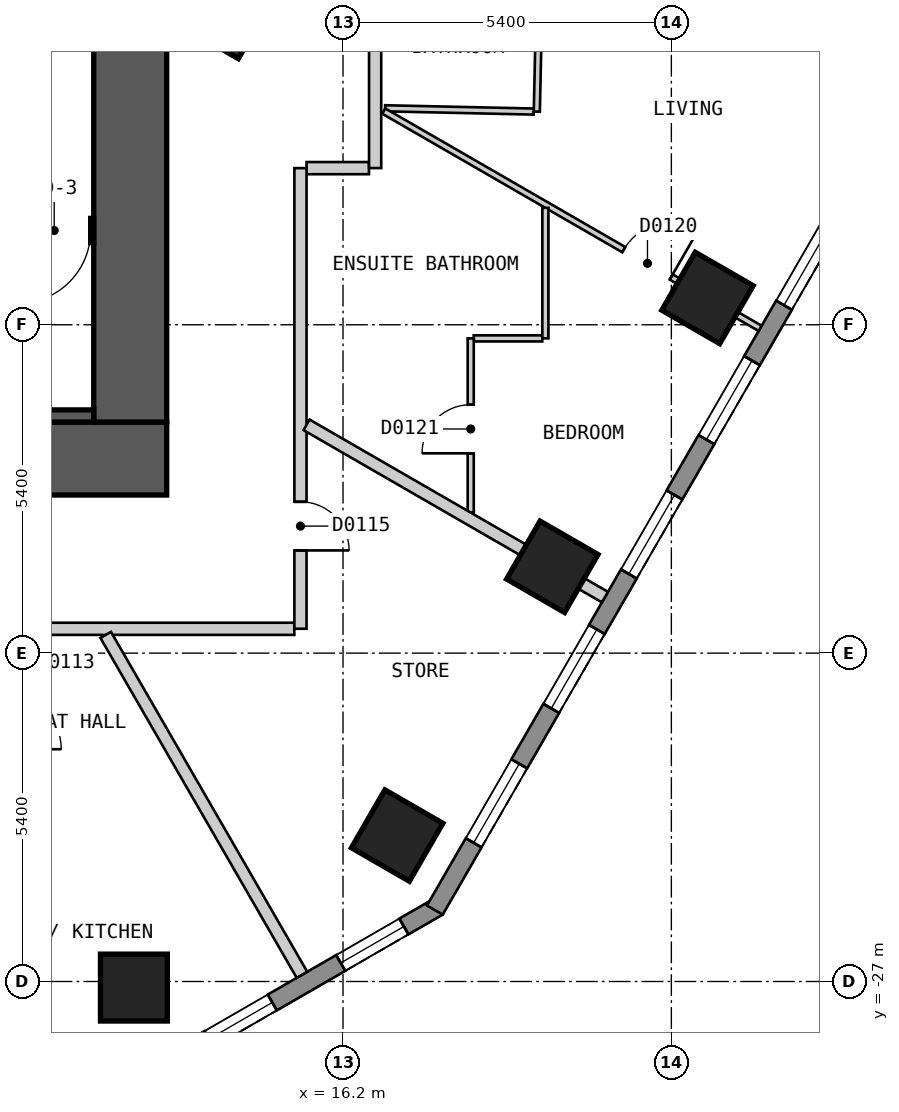
"""IFC4 building model, lengths in metres.
Left out: names, types, materials, properties, quantities, classifications, styles, units other than length and angle.
Written with IfcOpenShell. Run it as: python <this file> out.ifc"""

import sys

from ifc_helpers import new_model, si_unit, direction, frame, frame_2d, origin, origin_2d, place, context, subcontext, project, spatial, polyline, rectangle, outline, extrude, element, fill, save


model = new_model("IFC4")
c1 = context("Model", 3, precision=1e-05, world=origin(), true_north=direction((0.0, 1.0)))
c2 = subcontext(c1, "Body", "Model", "MODEL_VIEW")
j1 = project(units=[si_unit("LENGTHUNIT", "METRE"), si_unit("PLANEANGLEUNIT", "RADIAN")], contexts=[c1])
p1 = place(None, origin())
s1 = spatial("IfcSite", under=j1, at=p1, CompositionType="ELEMENT")
p2 = place(p1, origin())
s2 = spatial("IfcBuilding", under=s1, at=p2, CompositionType="ELEMENT")
p3 = place(p2, frame((0.0, 0.0, 23.4)))
s3 = spatial("IfcBuildingStorey", under=s2, at=p3, CompositionType="ELEMENT", Elevation=23.4)
for number, where, z_axis, x_axis in (
    (1, (12.761, -27.1, 0.0), (0.0, 0.0, 1.0), (1.0, 0.0, 0.0)),
    (2, (17.09, -24.6, 0.0), (0.0, 0.0, 1.0), (0.5, 0.866, 0.0)),
    (3, (19.642, -20.18, 0.0), (0.0, 0.0, 1.0), (0.5, 0.866, 0.0)),
    (4, (22.194, -15.759, 0.0), (0.0, 0.0, 1.0), (0.5, 0.866, 0.0)),
    (5, (24.746, -11.339, 0.0), (0.0, 0.0, 1.0), (0.5, 0.866, 0.0)),
):
    element("IfcColumn", number, at=place(p3, frame(where, z_axis=z_axis, x_axis=x_axis)), inside=s3, PredefinedType="COLUMN", context=c2, shape_type="SweptSolid", body=[
        extrude(rectangle(XDim=1.1, YDim=1.1, at=origin_2d()), origin(), (0.0, 0.0, 1.0), 3.0),
    ])
p4 = place(p3, frame((14.313, -11.209, 0.0), z_axis=(0.0, 0.0, 1.0), x_axis=(0.499984884929, 0.866034130299, 0.0)))
e6 = element("IfcColumn", 6, at=p4, inside=s3, PredefinedType="COLUMN", context=c2, shape_type="SweptSolid", body=[
    extrude(rectangle(XDim=0.9, YDim=0.9, at=origin_2d()), origin(), (0.0, 0.0, 1.0), 3.0),
])
p5 = place(p3, frame((-13.3, -18.4, 0.0), z_axis=(0.0, 0.0, 1.0), x_axis=(1.0, 0.0, 0.0)))
e7 = element("IfcWall", 7, at=p5, inside=s3, PredefinedType="SHEAR", context=c2, shape_type="SweptSolid", body=[
    extrude(rectangle(XDim=26.6, YDim=1.2, at=frame_2d((13.3, 0.0))), origin(), (0.0, 0.0, 1.0), 2.7),
])
p6 = place(p3, frame((12.7, -17.8, 0.0), z_axis=(0.0, 0.0, 1.0), x_axis=(0.0, 1.0, 0.0)))
e8 = element("IfcWall", 8, at=p6, inside=s3, PredefinedType="SHEAR", context=c2, shape_type="SweptSolid", body=[
    extrude(rectangle(XDim=11.6, YDim=1.2, at=frame_2d((5.8, 0.0))), origin(), (0.0, 0.0, 1.0), 2.7),
])
p7 = place(p3, frame((-12.1, -14.65, 0.0), z_axis=(0.0, 0.0, 1.0), x_axis=(1.0, 0.0, 0.0)))
e9 = element("IfcWall", 9, at=p7, inside=s3, PredefinedType="SHEAR", context=c2, shape_type="SweptSolid", body=[
    extrude(rectangle(XDim=24.2, YDim=0.4, at=frame_2d((12.1, 0.0))), origin(), (0.0, 0.0, 1.0), 2.7),
])
p8 = place(p7, frame((1.3, 0.0, 0.0), z_axis=(0.0, 0.0, 1.0), x_axis=(-1.0, 0.0, 0.0)))
e10 = element("IfcOpeningElement", 10, at=p8, cuts=e9, PredefinedType="OPENING", context=c2, shape_type="SweptSolid", body=[
    extrude(rectangle(XDim=1.2, YDim=2.1, at=frame_2d((0.6, 1.05))), frame((0.0, 0.21, 0.0), z_axis=(0.0, -1.0, 0.0), x_axis=(1.0, 0.0, 0.0)), (0.0, 0.0, 1.0), 0.42),
])
p9 = place(p7, frame((24.15, 0.0, 0.0), z_axis=(0.0, 0.0, 1.0), x_axis=(-1.0, 0.0, 0.0)))
e11 = element("IfcOpeningElement", 11, at=p9, cuts=e9, PredefinedType="OPENING", context=c2, shape_type="SweptSolid", body=[
    extrude(rectangle(XDim=1.2, YDim=2.1, at=frame_2d((0.6, 1.05))), frame((0.0, 0.21, 0.0), z_axis=(0.0, -1.0, 0.0), x_axis=(1.0, 0.0, 0.0)), (0.0, 0.0, 1.0), 0.42),
])
p10 = place(p7, frame((16.25, 0.0, 0.0), z_axis=(0.0, 0.0, 1.0), x_axis=(-1.0, 0.0, 0.0)))
e12 = element("IfcOpeningElement", 12, at=p10, cuts=e9, PredefinedType="OPENING", context=c2, shape_type="SweptSolid", body=[
    extrude(rectangle(XDim=0.9, YDim=2.1, at=frame_2d((0.45, 1.05))), frame((0.0, 0.21, 0.0), z_axis=(0.0, -1.0, 0.0), x_axis=(1.0, 0.0, 0.0)), (0.0, 0.0, 1.0), 0.42),
])
p11 = place(p7, frame((18.05, 0.0, 0.0), z_axis=(0.0, 0.0, 1.0), x_axis=(-1.0, 0.0, 0.0)))
e13 = element("IfcOpeningElement", 13, at=p11, cuts=e9, PredefinedType="OPENING", context=c2, shape_type="SweptSolid", body=[
    extrude(rectangle(XDim=0.9, YDim=2.1, at=frame_2d((0.45, 1.05))), frame((0.0, 0.21, 0.0), z_axis=(0.0, -1.0, 0.0), x_axis=(1.0, 0.0, 0.0)), (0.0, 0.0, 1.0), 0.42),
])
p12 = place(p3, frame((13.435, -28.27, 0.0), z_axis=(0.0, 0.0, 1.0), x_axis=(0.866010750942, 0.50002537861, 0.0)))
e14 = element("IfcWall", 14, at=p12, inside=s3, PredefinedType="SOLIDWALL", context=c2, shape_type="SweptSolid", body=[
    extrude(outline(polyline([(0.0, -0.15), (5.0, -0.15), (4.919, 0.15), (0.08, 0.15), (0.0, -0.15)])), origin(), (0.0, 0.0, 1.0), 2.7),
])
p13 = place(p12, frame((0.65, 0.0, 0.15)))
e15 = element("IfcOpeningElement", 15, at=p13, cuts=e14, PredefinedType="OPENING", context=c2, shape_type="SweptSolid", body=[
    extrude(rectangle(XDim=1.2, YDim=2.1, at=frame_2d((0.6, 1.05))), frame((0.0, 0.16, 0.0), z_axis=(0.0, -1.0, 0.0), x_axis=(1.0, 0.0, 0.0)), (0.0, 0.0, 1.0), 0.32),
])
p14 = place(p12, frame((3.149, 0.0, 0.15)))
e16 = element("IfcOpeningElement", 16, at=p14, cuts=e14, PredefinedType="OPENING", context=c2, shape_type="SweptSolid", body=[
    extrude(rectangle(XDim=1.2, YDim=2.1, at=frame_2d((0.6, 1.05))), frame((0.0, 0.16, 0.0), z_axis=(0.0, -1.0, 0.0), x_axis=(1.0, 0.0, 0.0)), (0.0, 0.0, 1.0), 0.32),
])
p15 = place(p3, frame((17.71, -25.825, 0.0), z_axis=(0.0, 0.0, 1.0), x_axis=(0.500001938803, 0.866024284413, 0.0)))
e17 = element("IfcWall", 17, at=p15, inside=s3, PredefinedType="SOLIDWALL", context=c2, shape_type="SweptSolid", body=[
    extrude(outline(polyline([(0.0, -0.15), (27.02, -0.15), (26.94, 0.15), (0.08, 0.15), (0.0, -0.15)])), origin(), (0.0, 0.0, 1.0), 2.7),
])
p16 = place(p15, frame((1.277, 0.0, 0.15)))
e18 = element("IfcOpeningElement", 18, at=p16, cuts=e17, PredefinedType="OPENING", context=c2, shape_type="SweptSolid", body=[
    extrude(rectangle(XDim=1.5, YDim=2.1, at=frame_2d((0.75, 1.05))), frame((0.0, 0.16, 0.0), z_axis=(0.0, -1.0, 0.0), x_axis=(1.0, 0.0, 0.0)), (0.0, 0.0, 1.0), 0.32),
])
p17 = place(p15, frame((3.829, 0.0, 0.15)))
e19 = element("IfcOpeningElement", 19, at=p17, cuts=e17, PredefinedType="OPENING", context=c2, shape_type="SweptSolid", body=[
    extrude(rectangle(XDim=1.5, YDim=2.1, at=frame_2d((0.75, 1.05))), frame((0.0, 0.16, 0.0), z_axis=(0.0, -1.0, 0.0), x_axis=(1.0, 0.0, 0.0)), (0.0, 0.0, 1.0), 0.32),
])
p18 = place(p15, frame((6.382, 0.0, 0.15)))
e20 = element("IfcOpeningElement", 20, at=p18, cuts=e17, PredefinedType="OPENING", context=c2, shape_type="SweptSolid", body=[
    extrude(rectangle(XDim=1.5, YDim=2.1, at=frame_2d((0.75, 1.05))), frame((0.0, 0.16, 0.0), z_axis=(0.0, -1.0, 0.0), x_axis=(1.0, 0.0, 0.0)), (0.0, 0.0, 1.0), 0.32),
])
p19 = place(p15, frame((8.933, 0.0, 0.15)))
e21 = element("IfcOpeningElement", 21, at=p19, cuts=e17, PredefinedType="OPENING", context=c2, shape_type="SweptSolid", body=[
    extrude(rectangle(XDim=1.5, YDim=2.1, at=frame_2d((0.75, 1.05))), frame((0.0, 0.16, 0.0), z_axis=(0.0, -1.0, 0.0), x_axis=(1.0, 0.0, 0.0)), (0.0, 0.0, 1.0), 0.32),
])
p20 = place(p15, frame((11.485, 0.0, 0.15)))
e22 = element("IfcOpeningElement", 22, at=p20, cuts=e17, PredefinedType="OPENING", context=c2, shape_type="SweptSolid", body=[
    extrude(rectangle(XDim=1.5, YDim=2.1, at=frame_2d((0.75, 1.05))), frame((0.0, 0.16, 0.0), z_axis=(0.0, -1.0, 0.0), x_axis=(1.0, 0.0, 0.0)), (0.0, 0.0, 1.0), 0.32),
])
p21 = place(p15, frame((14.037, 0.0, 0.15)))
e23 = element("IfcOpeningElement", 23, at=p21, cuts=e17, PredefinedType="OPENING", context=c2, shape_type="SweptSolid", body=[
    extrude(rectangle(XDim=1.5, YDim=2.1, at=frame_2d((0.75, 1.05))), frame((0.0, 0.16, 0.0), z_axis=(0.0, -1.0, 0.0), x_axis=(1.0, 0.0, 0.0)), (0.0, 0.0, 1.0), 0.32),
])
p22 = place(p15, frame((16.589, 0.0, 0.15)))
e24 = element("IfcOpeningElement", 24, at=p22, cuts=e17, PredefinedType="OPENING", context=c2, shape_type="SweptSolid", body=[
    extrude(rectangle(XDim=1.5, YDim=2.1, at=frame_2d((0.75, 1.05))), frame((0.0, 0.16, 0.0), z_axis=(0.0, -1.0, 0.0), x_axis=(1.0, 0.0, 0.0)), (0.0, 0.0, 1.0), 0.32),
])
p23 = place(p15, frame((19.141, 0.0, 0.15)))
e25 = element("IfcOpeningElement", 25, at=p23, cuts=e17, PredefinedType="OPENING", context=c2, shape_type="SweptSolid", body=[
    extrude(rectangle(XDim=1.5, YDim=2.1, at=frame_2d((0.75, 1.05))), frame((0.0, 0.16, 0.0), z_axis=(0.0, -1.0, 0.0), x_axis=(1.0, 0.0, 0.0)), (0.0, 0.0, 1.0), 0.32),
])
p24 = place(p15, frame((21.693, 0.0, 0.15)))
e26 = element("IfcOpeningElement", 26, at=p24, cuts=e17, PredefinedType="OPENING", context=c2, shape_type="SweptSolid", body=[
    extrude(rectangle(XDim=1.5, YDim=2.1, at=frame_2d((0.75, 1.05))), frame((0.0, 0.16, 0.0), z_axis=(0.0, -1.0, 0.0), x_axis=(1.0, 0.0, 0.0)), (0.0, 0.0, 1.0), 0.32),
])
p25 = place(p15, frame((24.244, 0.0, 0.15)))
e27 = element("IfcOpeningElement", 27, at=p25, cuts=e17, PredefinedType="OPENING", context=c2, shape_type="SweptSolid", body=[
    extrude(rectangle(XDim=1.5, YDim=2.1, at=frame_2d((0.75, 1.05))), frame((0.0, 0.16, 0.0), z_axis=(0.0, -1.0, 0.0), x_axis=(1.0, 0.0, 0.0)), (0.0, 0.0, 1.0), 0.32),
])
p26 = place(p3, frame((15.6, -13.624, 0.0), z_axis=(0.0, 0.0, 1.0), x_axis=(1.0, 0.0, 0.0)))
e28 = element("IfcWall", 28, at=p26, inside=s3, PredefinedType="PARTITIONING", context=c2, shape_type="SweptSolid", body=[
    extrude(rectangle(XDim=1.027, YDim=0.2, at=frame_2d((0.513, 0.0))), origin(), (0.0, 0.0, 1.0), 2.7),
])
p27 = place(p3, frame((-15.4, -21.2, 0.0), z_axis=(0.0, 0.0, 1.0), x_axis=(1.0, 0.0, 0.0)))
e29 = element("IfcWall", 29, at=p27, inside=s3, PredefinedType="PARTITIONING", context=c2, shape_type="SweptSolid", body=[
    extrude(rectangle(XDim=30.799, YDim=0.2, at=frame_2d((15.399, 0.0))), origin(), (0.0, 0.0, 1.0), 2.7),
])
p28 = place(p27, frame((4.985, 0.0, 0.0)))
e30 = element("IfcOpeningElement", 30, at=p28, cuts=e29, PredefinedType="OPENING", context=c2, shape_type="SweptSolid", body=[
    extrude(rectangle(XDim=0.9, YDim=2.1, at=frame_2d((0.45, 1.05))), frame((0.0, 0.11, 0.0), z_axis=(0.0, -1.0, 0.0), x_axis=(1.0, 0.0, 0.0)), (0.0, 0.0, 1.0), 0.22),
])
p29 = place(p27, frame((14.901, 0.0, 0.0)))
e31 = element("IfcOpeningElement", 31, at=p29, cuts=e29, PredefinedType="OPENING", context=c2, shape_type="SweptSolid", body=[
    extrude(rectangle(XDim=1.0, YDim=2.1, at=frame_2d((0.5, 1.05))), frame((0.0, 0.11, 0.0), z_axis=(0.0, -1.0, 0.0), x_axis=(1.0, 0.0, 0.0)), (0.0, 0.0, 1.0), 0.22),
])
p30 = place(p27, frame((20.005, 0.0, 0.0)))
e32 = element("IfcOpeningElement", 32, at=p30, cuts=e29, PredefinedType="OPENING", context=c2, shape_type="SweptSolid", body=[
    extrude(rectangle(XDim=1.0, YDim=2.1, at=frame_2d((0.5, 1.05))), frame((0.0, 0.11, 0.0), z_axis=(0.0, -1.0, 0.0), x_axis=(1.0, 0.0, 0.0)), (0.0, 0.0, 1.0), 0.22),
])
p31 = place(p27, frame((24.916, 0.0, 0.0)))
e33 = element("IfcOpeningElement", 33, at=p31, cuts=e29, PredefinedType="OPENING", context=c2, shape_type="SweptSolid", body=[
    extrude(rectangle(XDim=0.9, YDim=2.1, at=frame_2d((0.45, 1.05))), frame((0.0, 0.11, 0.0), z_axis=(0.0, -1.0, 0.0), x_axis=(1.0, 0.0, 0.0)), (0.0, 0.0, 1.0), 0.22),
])
p32 = place(p3, frame((15.5, -21.199, 0.0), z_axis=(0.0, 0.0, 1.0), x_axis=(0.0, 1.0, 0.0)))
e34 = element("IfcWall", 34, at=p32, inside=s3, PredefinedType="PARTITIONING", context=c2, shape_type="SweptSolid", body=[
    extrude(rectangle(XDim=7.575, YDim=0.2, at=frame_2d((3.788, 0.0))), origin(), (0.0, 0.0, 1.0), 2.7),
])
p33 = place(p32, frame((1.288, 0.0, 0.0)))
e35 = element("IfcOpeningElement", 35, at=p33, cuts=e34, PredefinedType="OPENING", context=c2, shape_type="SweptSolid", body=[
    extrude(rectangle(XDim=0.8, YDim=2.1, at=frame_2d((0.4, 1.05))), frame((0.0, 0.11, 0.0), z_axis=(0.0, -1.0, 0.0), x_axis=(1.0, 0.0, 0.0)), (0.0, 0.0, 1.0), 0.22),
])
p34 = place(p3, frame((16.728, -13.623, 0.0), z_axis=(0.0, 0.0, 1.0), x_axis=(0.0, 1.0, 0.0)))
e36 = element("IfcWall", 36, at=p34, inside=s3, PredefinedType="PARTITIONING", context=c2, shape_type="SweptSolid", body=[
    extrude(rectangle(XDim=4.72, YDim=0.2, at=frame_2d((2.36, 0.0))), origin(), (0.0, 0.0, 1.0), 2.7),
])
p35 = place(p34, frame((3.396, 0.0, 0.0)))
e37 = element("IfcOpeningElement", 37, at=p35, cuts=e36, PredefinedType="OPENING", context=c2, shape_type="SweptSolid", body=[
    extrude(rectangle(XDim=1.0, YDim=2.1, at=frame_2d((0.5, 1.05))), frame((0.0, 0.11, 0.0), z_axis=(0.0, -1.0, 0.0), x_axis=(1.0, 0.0, 0.0)), (0.0, 0.0, 1.0), 0.22),
])
p36 = place(p3, frame((16.892, -12.64, 0.0), z_axis=(0.0, 0.0, 1.0), x_axis=(0.999754359069, -0.022163517846, 0.0)))
e38 = element("IfcWall", 38, at=p36, inside=s3, PredefinedType="PARTITIONING", context=c2, shape_type="SweptSolid", body=[
    extrude(rectangle(XDim=2.445, YDim=0.1, at=frame_2d((1.223, 0.0))), origin(), (0.0, 0.0, 1.0), 2.7),
])
p37 = place(p3, frame((16.87, -12.686, 0.0), z_axis=(0.0, 0.0, 1.0), x_axis=(0.866071826058, -0.499919585642, 0.0)))
e39 = element("IfcWall", 39, at=p37, inside=s3, PredefinedType="PARTITIONING", context=c2, shape_type="SweptSolid", body=[
    extrude(rectangle(XDim=7.147, YDim=0.1, at=frame_2d((3.574, 0.0))), origin(), (0.0, 0.0, 1.0), 2.7),
])
p38 = place(p37, frame((4.558, 0.0, 0.0)))
e40 = element("IfcOpeningElement", 40, at=p38, cuts=e39, PredefinedType="OPENING", context=c2, shape_type="SweptSolid", body=[
    extrude(rectangle(XDim=0.9, YDim=2.1, at=frame_2d((0.45, 1.05))), frame((0.0, 0.06, 0.0), z_axis=(0.0, -1.0, 0.0), x_axis=(1.0, 0.0, 0.0)), (0.0, 0.0, 1.0), 0.12),
])
p39 = place(p3, frame((18.35, -16.424, 0.0), z_axis=(0.0, 0.0, 1.0), x_axis=(1.0, 0.0, 0.0)))
e41 = element("IfcWall", 41, at=p39, inside=s3, PredefinedType="PARTITIONING", context=c2, shape_type="SweptSolid", body=[
    extrude(rectangle(XDim=1.127, YDim=0.1, at=frame_2d((0.563, 0.0))), origin(), (0.0, 0.0, 1.0), 2.7),
])
p40 = place(p3, frame((19.387, -12.695, 0.0), z_axis=(0.0, 0.0, 1.0), x_axis=(0.022188864436, 0.99975379684, 0.0)))
e42 = element("IfcWall", 42, at=p40, inside=s3, PredefinedType="PARTITIONING", context=c2, shape_type="SweptSolid", body=[
    extrude(rectangle(XDim=4.28, YDim=0.1, at=frame_2d((2.14, 0.0))), origin(), (0.0, 0.0, 1.0), 2.7),
])
p41 = place(p40, frame((2.46, 0.0, 0.0)))
e43 = element("IfcOpeningElement", 43, at=p41, cuts=e42, PredefinedType="OPENING", context=c2, shape_type="SweptSolid", body=[
    extrude(rectangle(XDim=0.9, YDim=2.1, at=frame_2d((0.45, 1.05))), frame((0.0, 0.06, 0.0), z_axis=(0.0, -1.0, 0.0), x_axis=(1.0, 0.0, 0.0)), (0.0, 0.0, 1.0), 0.12),
])
p42 = place(p3, frame((18.3, -19.289, 0.0), z_axis=(0.0, 0.0, 1.0), x_axis=(0.0, 1.0, 0.0)))
e44 = element("IfcWall", 44, at=p42, inside=s3, PredefinedType="PARTITIONING", context=c2, shape_type="SweptSolid", body=[
    extrude(rectangle(XDim=2.865, YDim=0.1, at=frame_2d((1.433, 0.0))), origin(), (0.0, 0.0, 1.0), 2.7),
])
p43 = place(p42, frame((0.975, 0.0, 0.0)))
e45 = element("IfcOpeningElement", 45, at=p43, cuts=e44, PredefinedType="OPENING", context=c2, shape_type="SweptSolid", body=[
    extrude(rectangle(XDim=0.8, YDim=2.1, at=frame_2d((0.4, 1.05))), frame((0.0, 0.06, 0.0), z_axis=(0.0, -1.0, 0.0), x_axis=(1.0, 0.0, 0.0)), (0.0, 0.0, 1.0), 0.12),
])
p44 = place(p3, frame((19.528, -16.423, 0.0), z_axis=(0.0, 0.0, 1.0), x_axis=(0.0, 1.0, 0.0)))
e46 = element("IfcWall", 46, at=p44, inside=s3, PredefinedType="PARTITIONING", context=c2, shape_type="SweptSolid", body=[
    extrude(rectangle(XDim=2.146, YDim=0.1, at=frame_2d((1.073, 0.0))), origin(), (0.0, 0.0, 1.0), 2.7),
])
p45 = place(p3, frame((12.297, -21.3, 0.0), z_axis=(0.0, 0.0, 1.0), x_axis=(0.500056399578, -0.865992839024, 0.0)))
e47 = element("IfcWall", 47, at=p45, inside=s3, PredefinedType="PARTITIONING", context=c2, shape_type="SweptSolid", body=[
    extrude(rectangle(XDim=6.455, YDim=0.2, at=frame_2d((3.228, 0.0))), origin(), (0.0, 0.0, 1.0), 2.7),
])
p46 = place(p3, frame((15.6, -17.846, 0.0), z_axis=(0.0, 0.0, 1.0), x_axis=(0.866071523686, -0.499920109479, 0.0)))
e48 = element("IfcWall", 48, at=p46, inside=s3, PredefinedType="PARTITIONING", context=c2, shape_type="SweptSolid", body=[
    extrude(rectangle(XDim=5.667, YDim=0.2, at=frame_2d((2.833, 0.0))), origin(), (0.0, 0.0, 1.0), 2.7),
])
p47 = place(p3, frame((16.916, -6.819, 0.0), z_axis=(0.0, 0.0, 1.0), x_axis=(0.866028876723, -0.499993984646, 0.0)))
e49 = element("IfcWall", 49, at=p47, inside=s3, PredefinedType="PARTITIONING", context=c2, shape_type="SweptSolid", body=[
    extrude(rectangle(XDim=10.04, YDim=0.2, at=frame_2d((5.02, 0.0))), origin(), (0.0, 0.0, 1.0), 2.7),
])
p48 = place(p3, frame((6.7, -17.7, 0.0), z_axis=(0.0, 0.0, 1.0), x_axis=(1.0, 0.0, 0.0)))
e50 = element("IfcWall", 50, at=p48, inside=s3, PredefinedType="SOLIDWALL", context=c2, shape_type="SweptSolid", body=[
    extrude(rectangle(XDim=5.4, YDim=0.2, at=frame_2d((2.7, 0.0))), origin(), (0.0, 0.0, 1.0), 2.7),
])
p49 = place(p13, origin())
e51 = element("IfcWindow", 51, at=p49, inside=s3, PartitioningType="SINGLE_PANEL", PredefinedType="WINDOW", context=c2, shape_type="SweptSolid", body=[
    extrude(rectangle(XDim=1.2, YDim=2.1, at=frame_2d((0.6, 1.05))), frame((0.0, 0.03, 0.0), z_axis=(0.0, -1.0, 0.0), x_axis=(1.0, 0.0, 0.0)), (0.0, 0.0, 1.0), 0.06),
])
fill(e15, e51)
p50 = place(p14, origin())
e52 = element("IfcWindow", 52, at=p50, inside=s3, PartitioningType="SINGLE_PANEL", PredefinedType="WINDOW", context=c2, shape_type="SweptSolid", body=[
    extrude(rectangle(XDim=1.2, YDim=2.1, at=frame_2d((0.6, 1.05))), frame((0.0, 0.03, 0.0), z_axis=(0.0, -1.0, 0.0), x_axis=(1.0, 0.0, 0.0)), (0.0, 0.0, 1.0), 0.06),
])
fill(e16, e52)
p51 = place(p16, origin())
e53 = element("IfcWindow", 53, at=p51, inside=s3, PartitioningType="SINGLE_PANEL", PredefinedType="WINDOW", context=c2, shape_type="SweptSolid", body=[
    extrude(rectangle(XDim=1.5, YDim=2.1, at=frame_2d((0.75, 1.05))), frame((0.0, 0.03, 0.0), z_axis=(0.0, -1.0, 0.0), x_axis=(1.0, 0.0, 0.0)), (0.0, 0.0, 1.0), 0.06),
])
fill(e18, e53)
p52 = place(p17, origin())
e54 = element("IfcWindow", 54, at=p52, inside=s3, PartitioningType="SINGLE_PANEL", PredefinedType="WINDOW", context=c2, shape_type="SweptSolid", body=[
    extrude(rectangle(XDim=1.5, YDim=2.1, at=frame_2d((0.75, 1.05))), frame((0.0, 0.03, 0.0), z_axis=(0.0, -1.0, 0.0), x_axis=(1.0, 0.0, 0.0)), (0.0, 0.0, 1.0), 0.06),
])
fill(e19, e54)
p53 = place(p18, origin())
e55 = element("IfcWindow", 55, at=p53, inside=s3, PartitioningType="SINGLE_PANEL", PredefinedType="WINDOW", context=c2, shape_type="SweptSolid", body=[
    extrude(rectangle(XDim=1.5, YDim=2.1, at=frame_2d((0.75, 1.05))), frame((0.0, 0.03, 0.0), z_axis=(0.0, -1.0, 0.0), x_axis=(1.0, 0.0, 0.0)), (0.0, 0.0, 1.0), 0.06),
])
fill(e20, e55)
p54 = place(p19, origin())
e56 = element("IfcWindow", 56, at=p54, inside=s3, PartitioningType="SINGLE_PANEL", PredefinedType="WINDOW", context=c2, shape_type="SweptSolid", body=[
    extrude(rectangle(XDim=1.5, YDim=2.1, at=frame_2d((0.75, 1.05))), frame((0.0, 0.03, 0.0), z_axis=(0.0, -1.0, 0.0), x_axis=(1.0, 0.0, 0.0)), (0.0, 0.0, 1.0), 0.06),
])
fill(e21, e56)
p55 = place(p20, origin())
e57 = element("IfcWindow", 57, at=p55, inside=s3, PartitioningType="SINGLE_PANEL", PredefinedType="WINDOW", context=c2, shape_type="SweptSolid", body=[
    extrude(rectangle(XDim=1.5, YDim=2.1, at=frame_2d((0.75, 1.05))), frame((0.0, 0.03, 0.0), z_axis=(0.0, -1.0, 0.0), x_axis=(1.0, 0.0, 0.0)), (0.0, 0.0, 1.0), 0.06),
])
fill(e22, e57)
p56 = place(p33, origin())
e58 = element("IfcDoor", 58, at=p56, inside=s3, OperationType="SINGLE_SWING_LEFT", PredefinedType="DOOR", context=c2, shape_type="SweptSolid", body=[
    extrude(rectangle(XDim=0.8, YDim=2.1, at=frame_2d((0.4, 1.05))), frame((0.0, 0.025, 0.0), z_axis=(0.0, -1.0, 0.0), x_axis=(1.0, 0.0, 0.0)), (0.0, 0.0, 1.0), 0.05),
])
fill(e35, e58)
p57 = place(p38, origin())
e59 = element("IfcDoor", 59, at=p57, inside=s3, OperationType="SINGLE_SWING_RIGHT", PredefinedType="DOOR", context=c2, shape_type="SweptSolid", body=[
    extrude(rectangle(XDim=0.9, YDim=2.1, at=frame_2d((0.45, 1.05))), frame((0.0, 0.025, 0.0), z_axis=(0.0, -1.0, 0.0), x_axis=(1.0, 0.0, 0.0)), (0.0, 0.0, 1.0), 0.05),
])
fill(e40, e59)
p58 = place(p43, origin())
e60 = element("IfcDoor", 60, at=p58, inside=s3, OperationType="SINGLE_SWING_LEFT", PredefinedType="DOOR", context=c2, shape_type="SweptSolid", body=[
    extrude(rectangle(XDim=0.8, YDim=2.1, at=frame_2d((0.4, 1.05))), frame((0.0, 0.025, 0.0), z_axis=(0.0, -1.0, 0.0), x_axis=(1.0, 0.0, 0.0)), (0.0, 0.0, 1.0), 0.05),
])
fill(e45, e60)
p59 = place(p9, origin())
e61 = element("IfcDoor", 61, at=p59, inside=s3, OperationType="SINGLE_SWING_RIGHT", PredefinedType="DOOR", context=c2, shape_type="SweptSolid", body=[
    extrude(rectangle(XDim=1.2, YDim=2.1, at=frame_2d((0.6, 1.05))), frame((0.0, 0.025, 0.0), z_axis=(0.0, -1.0, 0.0), x_axis=(1.0, 0.0, 0.0)), (0.0, 0.0, 1.0), 0.05),
])
fill(e11, e61)
save(model, sys.argv[1])
